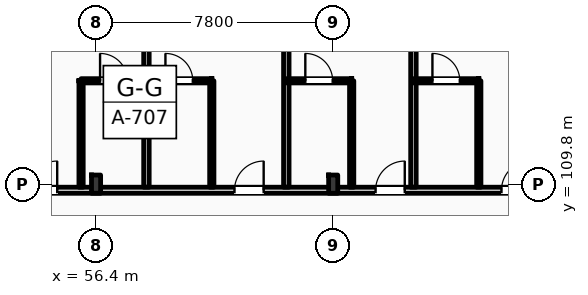
"""IFC4 building model, lengths in metres.
Left out: names, types, materials, properties, quantities, classifications, styles, units other than length and angle.
Written with IfcOpenShell. Run it as: python <this file> out.ifc"""

import sys

from ifc_helpers import new_model, si_unit, direction, frame, frame_2d, origin, origin_2d, place, context, subcontext, project, spatial, rectangle, i_section, extrude, element, fill, save


model = new_model("IFC4")
c1 = context("Model", 3, precision=1e-05, world=origin(), true_north=direction((0.0, 1.0)))
c2 = subcontext(c1, "Body", "Model", "MODEL_VIEW")
j1 = project(units=[si_unit("LENGTHUNIT", "METRE"), si_unit("PLANEANGLEUNIT", "RADIAN")], contexts=[c1])
p1 = place(None, origin())
s1 = spatial("IfcSite", under=j1, at=p1, CompositionType="ELEMENT")
p2 = place(p1, origin())
s2 = spatial("IfcBuilding", under=s1, at=p2, CompositionType="ELEMENT")
p3 = place(p2, frame((0.0, 0.0, 16.2)))
s3 = spatial("IfcBuildingStorey", under=s2, at=p3, CompositionType="ELEMENT", Elevation=16.2)
for number, where, z_axis, x_axis in (
    (1, (56.4, 109.8, 0.0), (0.0, 0.0, 1.0), (1.0, 0.0, 0.0)),
    (2, (64.2, 109.8, 0.0), (0.0, 0.0, 1.0), (1.0, 0.0, 0.0)),
):
    element("IfcColumn", number, at=place(p3, frame(where, z_axis=z_axis, x_axis=x_axis)), inside=s3, PredefinedType="COLUMN", context=c2, shape_type="SweptSolid", body=[
        extrude(i_section(OverallWidth=0.3, OverallDepth=0.6, WebThickness=0.015, FlangeThickness=0.03, FilletRadius=0.027, at=origin_2d()), origin(), (0.0, 0.0, 1.0), 4.2),
    ])
p4 = place(p3, frame((10.65, 109.6, 0.0), z_axis=(0.0, 0.0, 1.0), x_axis=(1.0, 0.0, 0.0)))
e3 = element("IfcWall", 3, at=p4, inside=s3, PredefinedType="PARTITIONING", context=c2, shape_type="SweptSolid", body=[
    extrude(rectangle(XDim=109.21, YDim=0.2, at=frame_2d((54.605, 0.0))), origin(), (0.0, 0.0, 1.0), 3.36),
])
p5 = place(p4, frame((15.43, 0.0, 0.0)))
e4 = element("IfcOpeningElement", 4, at=p5, cuts=e3, PredefinedType="OPENING", context=c2, shape_type="SweptSolid", body=[
    extrude(rectangle(XDim=1.02, YDim=2.2, at=frame_2d((0.51, 1.1))), frame((0.0, 0.11, 0.0), z_axis=(0.0, -1.0, 0.0), x_axis=(1.0, 0.0, 0.0)), (0.0, 0.0, 1.0), 0.22),
])
p6 = place(p4, frame((19.537, 0.0, 0.0)))
e5 = element("IfcOpeningElement", 5, at=p6, cuts=e3, PredefinedType="OPENING", context=c2, shape_type="SweptSolid", body=[
    extrude(rectangle(XDim=1.02, YDim=2.2, at=frame_2d((0.51, 1.1))), frame((0.0, 0.11, 0.0), z_axis=(0.0, -1.0, 0.0), x_axis=(1.0, 0.0, 0.0)), (0.0, 0.0, 1.0), 0.22),
])
p7 = place(p4, frame((23.928, 0.0, 0.0)))
e6 = element("IfcOpeningElement", 6, at=p7, cuts=e3, PredefinedType="OPENING", context=c2, shape_type="SweptSolid", body=[
    extrude(rectangle(XDim=1.02, YDim=2.2, at=frame_2d((0.51, 1.1))), frame((0.0, 0.11, 0.0), z_axis=(0.0, -1.0, 0.0), x_axis=(1.0, 0.0, 0.0)), (0.0, 0.0, 1.0), 0.22),
])
p8 = place(p4, frame((26.169, 0.0, 0.0)))
e7 = element("IfcOpeningElement", 7, at=p8, cuts=e3, PredefinedType="OPENING", context=c2, shape_type="SweptSolid", body=[
    extrude(rectangle(XDim=1.02, YDim=2.2, at=frame_2d((0.51, 1.1))), frame((0.0, 0.11, 0.0), z_axis=(0.0, -1.0, 0.0), x_axis=(1.0, 0.0, 0.0)), (0.0, 0.0, 1.0), 0.22),
])
p9 = place(p4, frame((32.739, 0.0, 0.0)))
e8 = element("IfcOpeningElement", 8, at=p9, cuts=e3, PredefinedType="OPENING", context=c2, shape_type="SweptSolid", body=[
    extrude(rectangle(XDim=0.96, YDim=2.2, at=frame_2d((0.48, 1.1))), frame((0.0, 0.11, 0.0), z_axis=(0.0, -1.0, 0.0), x_axis=(1.0, 0.0, 0.0)), (0.0, 0.0, 1.0), 0.22),
])
p10 = place(p4, frame((34.98, 0.0, 0.0)))
e9 = element("IfcOpeningElement", 9, at=p10, cuts=e3, PredefinedType="OPENING", context=c2, shape_type="SweptSolid", body=[
    extrude(rectangle(XDim=0.96, YDim=2.2, at=frame_2d((0.48, 1.1))), frame((0.0, 0.11, 0.0), z_axis=(0.0, -1.0, 0.0), x_axis=(1.0, 0.0, 0.0)), (0.0, 0.0, 1.0), 0.22),
])
p11 = place(p4, frame((41.521, 0.0, 0.0)))
e10 = element("IfcOpeningElement", 10, at=p11, cuts=e3, PredefinedType="OPENING", context=c2, shape_type="SweptSolid", body=[
    extrude(rectangle(XDim=0.96, YDim=2.2, at=frame_2d((0.48, 1.1))), frame((0.0, 0.11, 0.0), z_axis=(0.0, -1.0, 0.0), x_axis=(1.0, 0.0, 0.0)), (0.0, 0.0, 1.0), 0.22),
])
p12 = place(p4, frame((43.512, 0.0, 0.0)))
e11 = element("IfcOpeningElement", 11, at=p12, cuts=e3, PredefinedType="OPENING", context=c2, shape_type="SweptSolid", body=[
    extrude(rectangle(XDim=0.96, YDim=2.2, at=frame_2d((0.48, 1.1))), frame((0.0, 0.11, 0.0), z_axis=(0.0, -1.0, 0.0), x_axis=(1.0, 0.0, 0.0)), (0.0, 0.0, 1.0), 0.22),
])
p13 = place(p4, frame((50.303, 0.0, 0.0)))
e12 = element("IfcOpeningElement", 12, at=p13, cuts=e3, PredefinedType="OPENING", context=c2, shape_type="SweptSolid", body=[
    extrude(rectangle(XDim=0.96, YDim=2.2, at=frame_2d((0.48, 1.1))), frame((0.0, 0.11, 0.0), z_axis=(0.0, -1.0, 0.0), x_axis=(1.0, 0.0, 0.0)), (0.0, 0.0, 1.0), 0.22),
])
p14 = place(p4, frame((54.944, 0.0, 0.0)))
e13 = element("IfcOpeningElement", 13, at=p14, cuts=e3, PredefinedType="OPENING", context=c2, shape_type="SweptSolid", body=[
    extrude(rectangle(XDim=0.96, YDim=2.2, at=frame_2d((0.48, 1.1))), frame((0.0, 0.11, 0.0), z_axis=(0.0, -1.0, 0.0), x_axis=(1.0, 0.0, 0.0)), (0.0, 0.0, 1.0), 0.22),
])
p15 = place(p4, frame((59.085, 0.0, 0.0)))
e14 = element("IfcOpeningElement", 14, at=p15, cuts=e3, PredefinedType="OPENING", context=c2, shape_type="SweptSolid", body=[
    extrude(rectangle(XDim=0.96, YDim=2.2, at=frame_2d((0.48, 1.1))), frame((0.0, 0.11, 0.0), z_axis=(0.0, -1.0, 0.0), x_axis=(1.0, 0.0, 0.0)), (0.0, 0.0, 1.0), 0.22),
])
p16 = place(p4, frame((63.476, 0.0, 0.0)))
e15 = element("IfcOpeningElement", 15, at=p16, cuts=e3, PredefinedType="OPENING", context=c2, shape_type="SweptSolid", body=[
    extrude(rectangle(XDim=0.96, YDim=2.2, at=frame_2d((0.48, 1.1))), frame((0.0, 0.11, 0.0), z_axis=(0.0, -1.0, 0.0), x_axis=(1.0, 0.0, 0.0)), (0.0, 0.0, 1.0), 0.22),
])
p17 = place(p4, frame((65.716, 0.0, 0.0)))
e16 = element("IfcOpeningElement", 16, at=p17, cuts=e3, PredefinedType="OPENING", context=c2, shape_type="SweptSolid", body=[
    extrude(rectangle(XDim=0.96, YDim=2.2, at=frame_2d((0.48, 1.1))), frame((0.0, 0.11, 0.0), z_axis=(0.0, -1.0, 0.0), x_axis=(1.0, 0.0, 0.0)), (0.0, 0.0, 1.0), 0.22),
])
p18 = place(p4, frame((72.257, 0.0, 0.0)))
e17 = element("IfcOpeningElement", 17, at=p18, cuts=e3, PredefinedType="OPENING", context=c2, shape_type="SweptSolid", body=[
    extrude(rectangle(XDim=0.96, YDim=2.2, at=frame_2d((0.48, 1.1))), frame((0.0, 0.11, 0.0), z_axis=(0.0, -1.0, 0.0), x_axis=(1.0, 0.0, 0.0)), (0.0, 0.0, 1.0), 0.22),
])
p19 = place(p4, frame((74.498, 0.0, 0.0)))
e18 = element("IfcOpeningElement", 18, at=p19, cuts=e3, PredefinedType="OPENING", context=c2, shape_type="SweptSolid", body=[
    extrude(rectangle(XDim=0.96, YDim=2.2, at=frame_2d((0.48, 1.1))), frame((0.0, 0.11, 0.0), z_axis=(0.0, -1.0, 0.0), x_axis=(1.0, 0.0, 0.0)), (0.0, 0.0, 1.0), 0.22),
])
p20 = place(p4, frame((81.039, 0.0, 0.0)))
e19 = element("IfcOpeningElement", 19, at=p20, cuts=e3, PredefinedType="OPENING", context=c2, shape_type="SweptSolid", body=[
    extrude(rectangle(XDim=0.96, YDim=2.2, at=frame_2d((0.48, 1.1))), frame((0.0, 0.11, 0.0), z_axis=(0.0, -1.0, 0.0), x_axis=(1.0, 0.0, 0.0)), (0.0, 0.0, 1.0), 0.22),
])
p21 = place(p4, frame((85.68, 0.0, 0.0)))
e20 = element("IfcOpeningElement", 20, at=p21, cuts=e3, PredefinedType="OPENING", context=c2, shape_type="SweptSolid", body=[
    extrude(rectangle(XDim=0.96, YDim=2.2, at=frame_2d((0.48, 1.1))), frame((0.0, 0.11, 0.0), z_axis=(0.0, -1.0, 0.0), x_axis=(1.0, 0.0, 0.0)), (0.0, 0.0, 1.0), 0.22),
])
p22 = place(p4, frame((89.82, 0.0, 0.0)))
e21 = element("IfcOpeningElement", 21, at=p22, cuts=e3, PredefinedType="OPENING", context=c2, shape_type="SweptSolid", body=[
    extrude(rectangle(XDim=0.96, YDim=2.2, at=frame_2d((0.48, 1.1))), frame((0.0, 0.11, 0.0), z_axis=(0.0, -1.0, 0.0), x_axis=(1.0, 0.0, 0.0)), (0.0, 0.0, 1.0), 0.22),
])
p23 = place(p4, frame((94.211, 0.0, 0.0)))
e22 = element("IfcOpeningElement", 22, at=p23, cuts=e3, PredefinedType="OPENING", context=c2, shape_type="SweptSolid", body=[
    extrude(rectangle(XDim=0.96, YDim=2.2, at=frame_2d((0.48, 1.1))), frame((0.0, 0.11, 0.0), z_axis=(0.0, -1.0, 0.0), x_axis=(1.0, 0.0, 0.0)), (0.0, 0.0, 1.0), 0.22),
])
p24 = place(p4, frame((98.602, 0.0, 0.0)))
e23 = element("IfcOpeningElement", 23, at=p24, cuts=e3, PredefinedType="OPENING", context=c2, shape_type="SweptSolid", body=[
    extrude(rectangle(XDim=0.96, YDim=2.2, at=frame_2d((0.48, 1.1))), frame((0.0, 0.11, 0.0), z_axis=(0.0, -1.0, 0.0), x_axis=(1.0, 0.0, 0.0)), (0.0, 0.0, 1.0), 0.22),
])
p25 = place(p4, frame((102.993, 0.0, 0.0)))
e24 = element("IfcOpeningElement", 24, at=p25, cuts=e3, PredefinedType="OPENING", context=c2, shape_type="SweptSolid", body=[
    extrude(rectangle(XDim=0.96, YDim=2.2, at=frame_2d((0.48, 1.1))), frame((0.0, 0.11, 0.0), z_axis=(0.0, -1.0, 0.0), x_axis=(1.0, 0.0, 0.0)), (0.0, 0.0, 1.0), 0.22),
])
p26 = place(p4, frame((105.269, 0.0, 0.0)))
e25 = element("IfcOpeningElement", 25, at=p26, cuts=e3, PredefinedType="OPENING", context=c2, shape_type="SweptSolid", body=[
    extrude(rectangle(XDim=0.96, YDim=2.2, at=frame_2d((0.48, 1.1))), frame((0.0, 0.11, 0.0), z_axis=(0.0, -1.0, 0.0), x_axis=(1.0, 0.0, 0.0)), (0.0, 0.0, 1.0), 0.22),
])
p27 = place(p4, frame((2.716, 0.0, 0.0)))
e26 = element("IfcOpeningElement", 26, at=p27, cuts=e3, PredefinedType="OPENING", context=c2, shape_type="SweptSolid", body=[
    extrude(rectangle(XDim=1.35, YDim=2.25, at=frame_2d((0.675, 1.125))), frame((0.0, 0.11, 0.0), z_axis=(0.0, -1.0, 0.0), x_axis=(1.0, 0.0, 0.0)), (0.0, 0.0, 1.0), 0.22),
])
p28 = place(p4, frame((6.65, 0.0, 0.0)))
e27 = element("IfcOpeningElement", 27, at=p28, cuts=e3, PredefinedType="OPENING", context=c2, shape_type="SweptSolid", body=[
    extrude(rectangle(XDim=1.35, YDim=2.25, at=frame_2d((0.675, 1.125))), frame((0.0, 0.11, 0.0), z_axis=(0.0, -1.0, 0.0), x_axis=(1.0, 0.0, 0.0)), (0.0, 0.0, 1.0), 0.22),
])
p29 = place(p4, frame((10.583, 0.0, 0.0)))
e28 = element("IfcOpeningElement", 28, at=p29, cuts=e3, PredefinedType="OPENING", context=c2, shape_type="SweptSolid", body=[
    extrude(rectangle(XDim=1.35, YDim=2.25, at=frame_2d((0.675, 1.125))), frame((0.0, 0.11, 0.0), z_axis=(0.0, -1.0, 0.0), x_axis=(1.0, 0.0, 0.0)), (0.0, 0.0, 1.0), 0.22),
])
p30 = place(p3, frame((58.057, 109.7, 0.0), z_axis=(0.0, 0.0, 1.0), x_axis=(0.0, 1.0, 0.0)))
e29 = element("IfcWall", 29, at=p30, inside=s3, PredefinedType="PARTITIONING", context=c2, shape_type="SweptSolid", body=[
    extrude(rectangle(XDim=8.15, YDim=0.18, at=frame_2d((4.075, 0.0))), origin(), (0.0, 0.0, 1.0), 3.92),
])
p31 = place(p3, frame((55.907, 109.7, 0.0), z_axis=(0.0, 0.0, 1.0), x_axis=(0.0, 1.0, 0.0)))
e30 = element("IfcWall", 30, at=p31, inside=s3, PredefinedType="PARTITIONING", context=c2, shape_type="SweptSolid", body=[
    extrude(rectangle(XDim=3.5, YDim=0.14, at=frame_2d((1.75, 0.0))), origin(), (0.0, 0.0, 1.0), 3.92),
])
p32 = place(p3, frame((55.907, 113.2, 0.0), z_axis=(0.0, 0.0, 1.0), x_axis=(1.0, 0.0, 0.0)))
e31 = element("IfcWall", 31, at=p32, inside=s3, PredefinedType="PARTITIONING", context=c2, shape_type="SweptSolid", body=[
    extrude(rectangle(XDim=2.15, YDim=0.14, at=frame_2d((1.075, 0.0))), origin(), (0.0, 0.0, 1.0), 3.92),
])
p33 = place(p32, frame((0.625, 0.0, 0.0)))
e32 = element("IfcOpeningElement", 32, at=p33, cuts=e31, PredefinedType="OPENING", context=c2, shape_type="SweptSolid", body=[
    extrude(rectangle(XDim=0.9, YDim=2.1, at=frame_2d((0.45, 1.05))), frame((0.0, 0.08, 0.0), z_axis=(0.0, -1.0, 0.0), x_axis=(1.0, 0.0, 0.0)), (0.0, 0.0, 1.0), 0.16),
])
p34 = place(p3, frame((62.658, 109.7, 0.0), z_axis=(0.0, 0.0, 1.0), x_axis=(0.0, 1.0, 0.0)))
e33 = element("IfcWall", 33, at=p34, inside=s3, PredefinedType="PARTITIONING", context=c2, shape_type="SweptSolid", body=[
    extrude(rectangle(XDim=8.15, YDim=0.18, at=frame_2d((4.075, 0.0))), origin(), (0.0, 0.0, 1.0), 3.92),
])
p35 = place(p3, frame((60.207, 109.7, 0.0), z_axis=(0.0, 0.0, 1.0), x_axis=(0.0, 1.0, 0.0)))
e34 = element("IfcWall", 34, at=p35, inside=s3, PredefinedType="PARTITIONING", context=c2, shape_type="SweptSolid", body=[
    extrude(rectangle(XDim=3.5, YDim=0.14, at=frame_2d((1.75, 0.0))), origin(), (0.0, 0.0, 1.0), 3.92),
])
p36 = place(p3, frame((58.057, 113.2, 0.0), z_axis=(0.0, 0.0, 1.0), x_axis=(1.0, 0.0, 0.0)))
e35 = element("IfcWall", 35, at=p36, inside=s3, PredefinedType="PARTITIONING", context=c2, shape_type="SweptSolid", body=[
    extrude(rectangle(XDim=2.15, YDim=0.14, at=frame_2d((1.075, 0.0))), origin(), (0.0, 0.0, 1.0), 3.92),
])
p37 = place(p36, frame((0.625, 0.0, 0.0)))
e36 = element("IfcOpeningElement", 36, at=p37, cuts=e35, PredefinedType="OPENING", context=c2, shape_type="SweptSolid", body=[
    extrude(rectangle(XDim=0.9, YDim=2.1, at=frame_2d((0.45, 1.05))), frame((0.0, 0.08, 0.0), z_axis=(0.0, -1.0, 0.0), x_axis=(1.0, 0.0, 0.0)), (0.0, 0.0, 1.0), 0.16),
])
p38 = place(p3, frame((66.839, 109.7, 0.0), z_axis=(0.0, 0.0, 1.0), x_axis=(0.0, 1.0, 0.0)))
e37 = element("IfcWall", 37, at=p38, inside=s3, PredefinedType="PARTITIONING", context=c2, shape_type="SweptSolid", body=[
    extrude(rectangle(XDim=8.15, YDim=0.18, at=frame_2d((4.075, 0.0))), origin(), (0.0, 0.0, 1.0), 3.61),
])
p39 = place(p3, frame((64.808, 109.7, 0.0), z_axis=(0.0, 0.0, 1.0), x_axis=(0.0, 1.0, 0.0)))
e38 = element("IfcWall", 38, at=p39, inside=s3, PredefinedType="PARTITIONING", context=c2, shape_type="SweptSolid", body=[
    extrude(rectangle(XDim=3.5, YDim=0.14, at=frame_2d((1.75, 0.0))), origin(), (0.0, 0.0, 1.0), 3.92),
])
p40 = place(p3, frame((62.658, 113.2, 0.0), z_axis=(0.0, 0.0, 1.0), x_axis=(1.0, 0.0, 0.0)))
e39 = element("IfcWall", 39, at=p40, inside=s3, PredefinedType="PARTITIONING", context=c2, shape_type="SweptSolid", body=[
    extrude(rectangle(XDim=2.15, YDim=0.14, at=frame_2d((1.075, 0.0))), origin(), (0.0, 0.0, 1.0), 3.92),
])
p41 = place(p40, frame((0.625, 0.0, 0.0)))
e40 = element("IfcOpeningElement", 40, at=p41, cuts=e39, PredefinedType="OPENING", context=c2, shape_type="SweptSolid", body=[
    extrude(rectangle(XDim=0.9, YDim=2.1, at=frame_2d((0.45, 1.05))), frame((0.0, 0.08, 0.0), z_axis=(0.0, -1.0, 0.0), x_axis=(1.0, 0.0, 0.0)), (0.0, 0.0, 1.0), 0.16),
])
p42 = place(p3, frame((68.989, 109.7, 0.0), z_axis=(0.0, 0.0, 1.0), x_axis=(0.0, 1.0, 0.0)))
e41 = element("IfcWall", 41, at=p42, inside=s3, PredefinedType="PARTITIONING", context=c2, shape_type="SweptSolid", body=[
    extrude(rectangle(XDim=3.5, YDim=0.14, at=frame_2d((1.75, 0.0))), origin(), (0.0, 0.0, 1.0), 3.92),
])
p43 = place(p3, frame((66.839, 113.2, 0.0), z_axis=(0.0, 0.0, 1.0), x_axis=(1.0, 0.0, 0.0)))
e42 = element("IfcWall", 42, at=p43, inside=s3, PredefinedType="PARTITIONING", context=c2, shape_type="SweptSolid", body=[
    extrude(rectangle(XDim=2.15, YDim=0.14, at=frame_2d((1.075, 0.0))), origin(), (0.0, 0.0, 1.0), 3.92),
])
p44 = place(p43, frame((0.625, 0.0, 0.0)))
e43 = element("IfcOpeningElement", 43, at=p44, cuts=e42, PredefinedType="OPENING", context=c2, shape_type="SweptSolid", body=[
    extrude(rectangle(XDim=0.9, YDim=2.1, at=frame_2d((0.45, 1.05))), frame((0.0, 0.08, 0.0), z_axis=(0.0, -1.0, 0.0), x_axis=(1.0, 0.0, 0.0)), (0.0, 0.0, 1.0), 0.16),
])
p45 = place(p12, origin())
e44 = element("IfcDoor", 44, at=p45, inside=s3, OperationType="SINGLE_SWING_RIGHT", PredefinedType="DOOR", context=c2, shape_type="SweptSolid", body=[
    extrude(rectangle(XDim=0.96, YDim=2.2, at=frame_2d((0.48, 1.1))), frame((0.0, 0.025, 0.0), z_axis=(0.0, -1.0, 0.0), x_axis=(1.0, 0.0, 0.0)), (0.0, 0.0, 1.0), 0.05),
])
fill(e11, e44)
p46 = place(p33, origin())
e45 = element("IfcDoor", 45, at=p46, inside=s3, OperationType="SINGLE_SWING_LEFT", PredefinedType="DOOR", context=c2, shape_type="SweptSolid", body=[
    extrude(rectangle(XDim=0.9, YDim=2.1, at=frame_2d((0.45, 1.05))), frame((0.0, 0.025, 0.0), z_axis=(0.0, -1.0, 0.0), x_axis=(1.0, 0.0, 0.0)), (0.0, 0.0, 1.0), 0.05),
])
fill(e32, e45)
p47 = place(p13, origin())
e46 = element("IfcDoor", 46, at=p47, inside=s3, OperationType="SINGLE_SWING_RIGHT", PredefinedType="DOOR", context=c2, shape_type="SweptSolid", body=[
    extrude(rectangle(XDim=0.96, YDim=2.2, at=frame_2d((0.48, 1.1))), frame((0.0, 0.025, 0.0), z_axis=(0.0, -1.0, 0.0), x_axis=(1.0, 0.0, 0.0)), (0.0, 0.0, 1.0), 0.05),
])
fill(e12, e46)
p48 = place(p37, origin())
e47 = element("IfcDoor", 47, at=p48, inside=s3, OperationType="SINGLE_SWING_LEFT", PredefinedType="DOOR", context=c2, shape_type="SweptSolid", body=[
    extrude(rectangle(XDim=0.9, YDim=2.1, at=frame_2d((0.45, 1.05))), frame((0.0, 0.025, 0.0), z_axis=(0.0, -1.0, 0.0), x_axis=(1.0, 0.0, 0.0)), (0.0, 0.0, 1.0), 0.05),
])
fill(e36, e47)
p49 = place(p14, origin())
e48 = element("IfcDoor", 48, at=p49, inside=s3, OperationType="SINGLE_SWING_RIGHT", PredefinedType="DOOR", context=c2, shape_type="SweptSolid", body=[
    extrude(rectangle(XDim=0.96, YDim=2.2, at=frame_2d((0.48, 1.1))), frame((0.0, 0.025, 0.0), z_axis=(0.0, -1.0, 0.0), x_axis=(1.0, 0.0, 0.0)), (0.0, 0.0, 1.0), 0.05),
])
fill(e13, e48)
p50 = place(p41, origin())
e49 = element("IfcDoor", 49, at=p50, inside=s3, OperationType="SINGLE_SWING_LEFT", PredefinedType="DOOR", context=c2, shape_type="SweptSolid", body=[
    extrude(rectangle(XDim=0.9, YDim=2.1, at=frame_2d((0.45, 1.05))), frame((0.0, 0.025, 0.0), z_axis=(0.0, -1.0, 0.0), x_axis=(1.0, 0.0, 0.0)), (0.0, 0.0, 1.0), 0.05),
])
fill(e40, e49)
p51 = place(p15, origin())
e50 = element("IfcDoor", 50, at=p51, inside=s3, OperationType="SINGLE_SWING_RIGHT", PredefinedType="DOOR", context=c2, shape_type="SweptSolid", body=[
    extrude(rectangle(XDim=0.96, YDim=2.2, at=frame_2d((0.48, 1.1))), frame((0.0, 0.025, 0.0), z_axis=(0.0, -1.0, 0.0), x_axis=(1.0, 0.0, 0.0)), (0.0, 0.0, 1.0), 0.05),
])
fill(e14, e50)
p52 = place(p44, origin())
e51 = element("IfcDoor", 51, at=p52, inside=s3, OperationType="SINGLE_SWING_LEFT", PredefinedType="DOOR", context=c2, shape_type="SweptSolid", body=[
    extrude(rectangle(XDim=0.9, YDim=2.1, at=frame_2d((0.45, 1.05))), frame((0.0, 0.025, 0.0), z_axis=(0.0, -1.0, 0.0), x_axis=(1.0, 0.0, 0.0)), (0.0, 0.0, 1.0), 0.05),
])
fill(e43, e51)
save(model, sys.argv[1])
